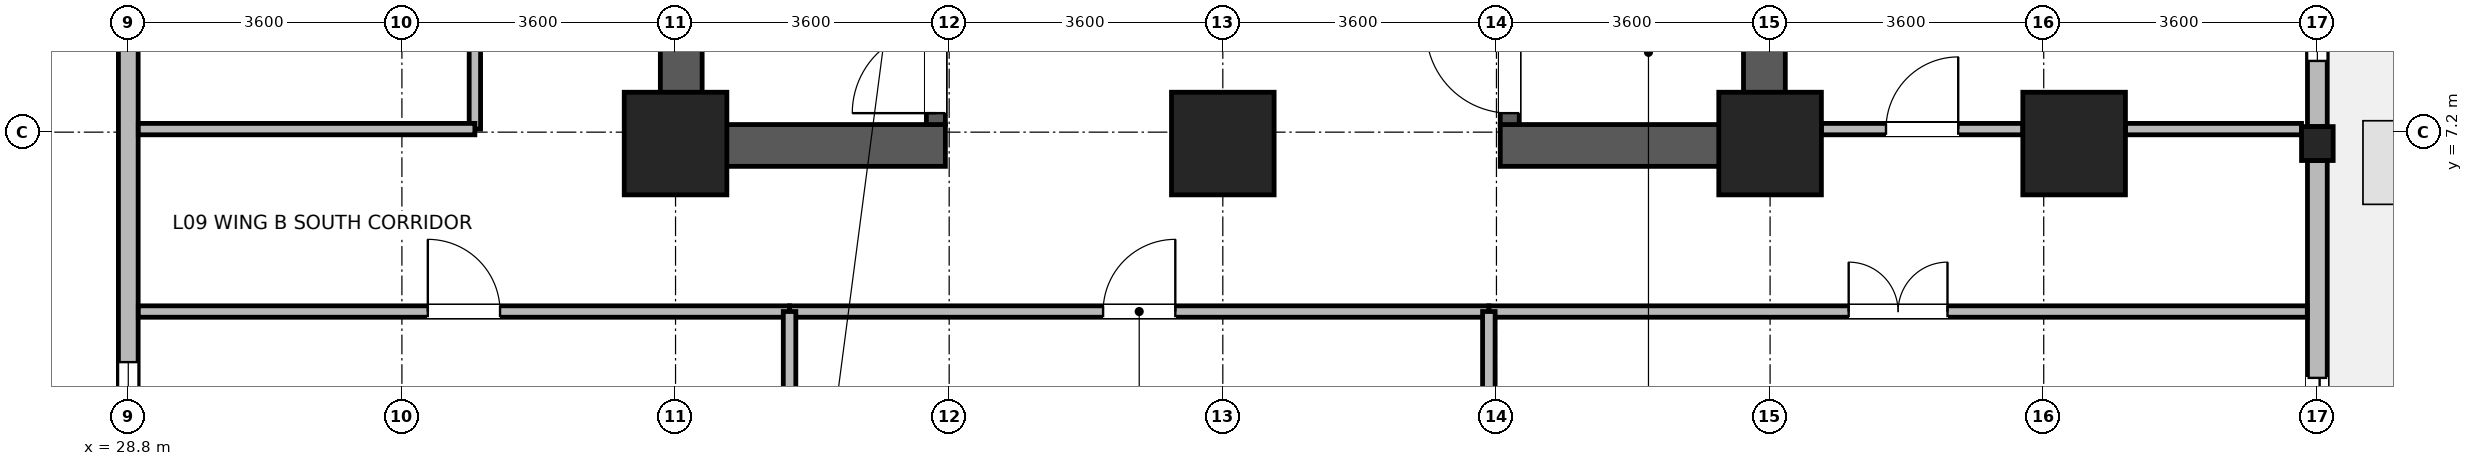
"""IFC4 building model, lengths in metres.
Left out: names, types, materials, properties, quantities, classifications, styles, units other than length and angle.
Written with IfcOpenShell. Run it as: python <this file> out.ifc"""

import sys

from ifc_helpers import new_model, si_unit, direction, frame, frame_2d, origin, origin_2d, place, context, subcontext, project, spatial, rectangle, i_section, extrude, source, transform, mapped, element, fill, save


model = new_model("IFC4")
c1 = context("Model", 3, precision=1e-05, world=origin(), true_north=direction((0.0, 1.0)))
c2 = subcontext(c1, "Body", "Model", "MODEL_VIEW")
j1 = project(units=[si_unit("LENGTHUNIT", "METRE"), si_unit("PLANEANGLEUNIT", "RADIAN")], contexts=[c1])
p1 = place(None, origin())
s1 = spatial("IfcSite", under=j1, at=p1, CompositionType="ELEMENT")
p2 = place(p1, origin())
s2 = spatial("IfcBuilding", under=s1, at=p2, CompositionType="ELEMENT")
p3 = place(p2, frame((0.0, 0.0, 40.1)))
s3 = spatial("IfcBuildingStorey", under=s2, at=p3, CompositionType="ELEMENT", Elevation=40.1)
for number, where, z_axis, x_axis in (
    (1, (36.075, 6.75, 0.0), (0.0, 0.0, 1.0), (0.0, 1.0, 0.0)),
    (2, (50.325, 6.75, 0.0), (0.0, 0.0, 1.0), (0.0, 1.0, 0.0)),
):
    element("IfcWall", number, at=place(p3, frame(where, z_axis=z_axis, x_axis=x_axis)), inside=s3, PredefinedType="SHEAR", context=c2, shape_type="SweptSolid", body=[
        extrude(rectangle(XDim=8.1, YDim=0.55, at=frame_2d((4.05, 0.0))), origin(), (0.0, 0.0, 1.0), 3.45),
    ])
for number, where, z_axis, x_axis in (
    (3, (36.35, 7.025, 0.0), (0.0, 0.0, 1.0), (1.0, 0.0, 0.0)),
    (4, (46.85, 7.025, 0.0), (0.0, 0.0, 1.0), (1.0, 0.0, 0.0)),
):
    element("IfcWall", number, at=place(p3, frame(where, z_axis=z_axis, x_axis=x_axis)), inside=s3, PredefinedType="SHEAR", context=c2, shape_type="SweptSolid", body=[
        extrude(rectangle(XDim=3.2, YDim=0.55, at=frame_2d((1.6, 0.0))), origin(), (0.0, 0.0, 1.0), 3.45),
    ])
p4 = place(p3, frame((39.425, 7.3, 0.0), z_axis=(0.0, 0.0, 1.0), x_axis=(0.0, 1.0, 0.0)))
e5 = element("IfcWall", 5, at=p4, inside=s3, PredefinedType="SHEAR", context=c2, shape_type="SweptSolid", body=[
    extrude(rectangle(XDim=7.0, YDim=0.25, at=frame_2d((3.5, 0.0))), origin(), (0.0, 0.0, 1.0), 3.45),
])
p5 = place(p4, frame((0.15, 0.0, 0.0)))
e6 = element("IfcOpeningElement", 6, at=p5, cuts=e5, PredefinedType="OPENING", context=c2, shape_type="SweptSolid", body=[
    extrude(rectangle(XDim=1.1, YDim=2.08, at=frame_2d((0.55, 1.04))), frame((0.0, 0.135, 0.0), z_axis=(0.0, -1.0, 0.0), x_axis=(1.0, 0.0, 0.0)), (0.0, 0.0, 1.0), 0.27),
])
p6 = place(p3, frame((46.975, 7.3, 0.0), z_axis=(0.0, 0.0, 1.0), x_axis=(0.0, 1.0, 0.0)))
e7 = element("IfcWall", 7, at=p6, inside=s3, PredefinedType="SHEAR", context=c2, shape_type="SweptSolid", body=[
    extrude(rectangle(XDim=7.0, YDim=0.25, at=frame_2d((3.5, 0.0))), origin(), (0.0, 0.0, 1.0), 3.45),
])
p7 = place(p6, frame((0.15, 0.0, 0.0)))
e8 = element("IfcOpeningElement", 8, at=p7, cuts=e7, PredefinedType="OPENING", context=c2, shape_type="SweptSolid", body=[
    extrude(rectangle(XDim=1.1, YDim=2.08, at=frame_2d((0.55, 1.04))), frame((0.0, 0.135, 0.0), z_axis=(0.0, -1.0, 0.0), x_axis=(1.0, 0.0, 0.0)), (0.0, 0.0, 1.0), 0.27),
])
m1 = source(origin(), c2, "Body", "SweptSolid", [
    extrude(rectangle(XDim=1.35, YDim=1.35, at=origin_2d()), origin(), (0.0, 0.0, 1.0), 3.7),
])
for number, where, z_axis, x_axis in (
    (9, (36.0, 7.05, 0.0), (0.0, 0.0, 1.0), (1.0, 0.0, 0.0)),
    (10, (43.2, 7.05, 0.0), (0.0, 0.0, 1.0), (1.0, 0.0, 0.0)),
    (11, (50.4, 7.05, 0.0), (0.0, 0.0, 1.0), (1.0, 0.0, 0.0)),
    (12, (54.4, 7.05, 0.0), (0.0, 0.0, 1.0), (1.0, 0.0, 0.0)),
):
    element("IfcColumn", number, at=place(p3, frame(where, z_axis=z_axis, x_axis=x_axis)), inside=s3, PredefinedType="COLUMN", context=c2, shape_type="MappedRepresentation", body=[
        mapped(m1, transform((0.0, 0.0, 0.0), x_axis=(1.0, 0.0, 0.0), y_axis=(0.0, 1.0, 0.0), z_axis=(0.0, 0.0, 1.0), scale=1.0)),
    ])
m2 = source(origin(), c2, "Body", "SweptSolid", [
    extrude(i_section(OverallWidth=0.416, OverallDepth=0.446, WebThickness=0.029, FlangeThickness=0.04, FilletRadius=0.015, at=origin_2d()), origin(), (0.0, 0.0, 1.0), 3.7),
])
p8 = place(p3, frame((57.6, 7.05, 0.0), z_axis=(0.0, 0.0, 1.0), x_axis=(1.0, 0.0, 0.0)))
e13 = element("IfcColumn", 13, at=p8, inside=s3, PredefinedType="COLUMN", context=c2, shape_type="MappedRepresentation", body=[
    mapped(m2, transform((0.0, 0.0, 0.0), x_axis=(1.0, 0.0, 0.0), y_axis=(0.0, 1.0, 0.0), z_axis=(0.0, 0.0, 1.0), scale=1.0)),
])
p9 = place(p3, frame((57.6, 6.826, 0.0), z_axis=(0.0, 0.0, 1.0), x_axis=(0.0, -1.0, 0.0)))
e14 = element("IfcWall", 14, at=p9, inside=s3, PredefinedType="STANDARD", context=c2, shape_type="SweptSolid", body=[
    extrude(rectangle(XDim=5.156, YDim=0.26, at=frame_2d((2.578, 0.0))), origin(), (0.0, 0.0, 1.0), 3.43),
])
p10 = place(p9, frame((2.859, 0.0, 0.0)))
e15 = element("IfcOpeningElement", 15, at=p10, cuts=e14, PredefinedType="OPENING", context=c2, shape_type="SweptSolid", body=[
    extrude(rectangle(XDim=1.5, YDim=2.15, at=frame_2d((0.75, 1.075))), frame((0.0, 0.14, 0.0), z_axis=(0.0, -1.0, 0.0), x_axis=(1.0, 0.0, 0.0)), (0.0, 0.0, 1.0), 0.28),
])
p11 = place(p3, frame((57.6, 14.326, 0.0), z_axis=(0.0, 0.0, 1.0), x_axis=(0.0, -1.0, 0.0)))
e16 = element("IfcWall", 16, at=p11, inside=s3, PredefinedType="STANDARD", context=c2, shape_type="SweptSolid", body=[
    extrude(rectangle(XDim=7.052, YDim=0.26, at=frame_2d((3.526, 0.0))), origin(), (0.0, 0.0, 1.0), 2.93),
])
p12 = place(p11, frame((0.863, 0.0, 0.85)))
e17 = element("IfcOpeningElement", 17, at=p12, cuts=e16, PredefinedType="OPENING", context=c2, shape_type="SweptSolid", body=[
    extrude(rectangle(XDim=1.8, YDim=1.85, at=frame_2d((0.9, 0.925))), frame((0.0, 0.14, 0.0), z_axis=(0.0, -1.0, 0.0), x_axis=(1.0, 0.0, 0.0)), (0.0, 0.0, 1.0), 0.28),
])
p13 = place(p11, frame((4.389, 0.0, 0.85)))
e18 = element("IfcOpeningElement", 18, at=p13, cuts=e16, PredefinedType="OPENING", context=c2, shape_type="SweptSolid", body=[
    extrude(rectangle(XDim=1.8, YDim=1.85, at=frame_2d((0.9, 0.925))), frame((0.0, 0.14, 0.0), z_axis=(0.0, -1.0, 0.0), x_axis=(1.0, 0.0, 0.0)), (0.0, 0.0, 1.0), 0.28),
])
p14 = place(p3, frame((28.8, 1.67, 0.0), z_axis=(0.0, 0.0, 1.0), x_axis=(0.0, 1.0, 0.0)))
e19 = element("IfcWall", 19, at=p14, inside=s3, PredefinedType="STANDARD", context=c2, shape_type="SweptSolid", body=[
    extrude(rectangle(XDim=19.254, YDim=0.26, at=frame_2d((9.627, 0.0))), origin(), (0.0, 0.0, 1.0), 3.43),
])
p15 = place(p14, frame((0.705, 0.0, 0.85)))
e20 = element("IfcOpeningElement", 20, at=p15, cuts=e19, PredefinedType="OPENING", context=c2, shape_type="SweptSolid", body=[
    extrude(rectangle(XDim=1.8, YDim=1.85, at=frame_2d((0.9, 0.925))), frame((0.0, 0.14, 0.0), z_axis=(0.0, -1.0, 0.0), x_axis=(1.0, 0.0, 0.0)), (0.0, 0.0, 1.0), 0.28),
])
p16 = place(p14, frame((7.123, 0.0, 0.85)))
e21 = element("IfcOpeningElement", 21, at=p16, cuts=e19, PredefinedType="OPENING", context=c2, shape_type="SweptSolid", body=[
    extrude(rectangle(XDim=1.8, YDim=1.85, at=frame_2d((0.9, 0.925))), frame((0.0, 0.14, 0.0), z_axis=(0.0, -1.0, 0.0), x_axis=(1.0, 0.0, 0.0)), (0.0, 0.0, 1.0), 0.28),
])
p17 = place(p14, frame((10.332, 0.0, 0.85)))
e22 = element("IfcOpeningElement", 22, at=p17, cuts=e19, PredefinedType="OPENING", context=c2, shape_type="SweptSolid", body=[
    extrude(rectangle(XDim=1.8, YDim=1.85, at=frame_2d((0.9, 0.925))), frame((0.0, 0.14, 0.0), z_axis=(0.0, -1.0, 0.0), x_axis=(1.0, 0.0, 0.0)), (0.0, 0.0, 1.0), 0.28),
])
p18 = place(p14, frame((13.541, 0.0, 0.85)))
e23 = element("IfcOpeningElement", 23, at=p18, cuts=e19, PredefinedType="OPENING", context=c2, shape_type="SweptSolid", body=[
    extrude(rectangle(XDim=1.8, YDim=1.85, at=frame_2d((0.9, 0.925))), frame((0.0, 0.14, 0.0), z_axis=(0.0, -1.0, 0.0), x_axis=(1.0, 0.0, 0.0)), (0.0, 0.0, 1.0), 0.28),
])
p19 = place(p14, frame((16.75, 0.0, 0.85)))
e24 = element("IfcOpeningElement", 24, at=p19, cuts=e19, PredefinedType="OPENING", context=c2, shape_type="SweptSolid", body=[
    extrude(rectangle(XDim=1.8, YDim=1.85, at=frame_2d((0.9, 0.925))), frame((0.0, 0.14, 0.0), z_axis=(0.0, -1.0, 0.0), x_axis=(1.0, 0.0, 0.0)), (0.0, 0.0, 1.0), 0.28),
])
p20 = place(p3, frame((46.7, 4.84, 0.0), z_axis=(0.0, 0.0, 1.0), x_axis=(1.0, 0.0, 0.0)))
e25 = element("IfcWall", 25, at=p20, inside=s3, PredefinedType="PARTITIONING", context=c2, shape_type="SweptSolid", body=[
    extrude(rectangle(XDim=10.768, YDim=0.15, at=frame_2d((5.384, 0.0))), origin(), (0.0, 0.0, 1.0), 3.43),
])
p21 = place(p20, frame((4.734, 0.0, 0.0)))
e26 = element("IfcOpeningElement", 26, at=p21, cuts=e25, PredefinedType="OPENING", context=c2, shape_type="SweptSolid", body=[
    extrude(rectangle(XDim=1.3, YDim=2.12, at=frame_2d((0.65, 1.06))), frame((0.0, 0.085, 0.0), z_axis=(0.0, -1.0, 0.0), x_axis=(1.0, 0.0, 0.0)), (0.0, 0.0, 1.0), 0.17),
])
p22 = place(p3, frame((37.5, 4.84, 0.0), z_axis=(0.0, 0.0, 1.0), x_axis=(1.0, 0.0, 0.0)))
e27 = element("IfcWall", 27, at=p22, inside=s3, PredefinedType="PARTITIONING", context=c2, shape_type="SweptSolid", body=[
    extrude(rectangle(XDim=9.2, YDim=0.15, at=frame_2d((4.6, 0.0))), origin(), (0.0, 0.0, 1.0), 3.43),
])
p23 = place(p22, frame((4.125, 0.0, 0.0)))
e28 = element("IfcOpeningElement", 28, at=p23, cuts=e27, PredefinedType="OPENING", context=c2, shape_type="SweptSolid", body=[
    extrude(rectangle(XDim=0.95, YDim=2.1, at=frame_2d((0.475, 1.05))), frame((0.0, 0.085, 0.0), z_axis=(0.0, -1.0, 0.0), x_axis=(1.0, 0.0, 0.0)), (0.0, 0.0, 1.0), 0.17),
])
p24 = place(p3, frame((28.932, 4.84, 0.0), z_axis=(0.0, 0.0, 1.0), x_axis=(1.0, 0.0, 0.0)))
e29 = element("IfcWall", 29, at=p24, inside=s3, PredefinedType="PARTITIONING", context=c2, shape_type="SweptSolid", body=[
    extrude(rectangle(XDim=8.568, YDim=0.15, at=frame_2d((4.284, 0.0))), origin(), (0.0, 0.0, 1.0), 3.43),
])
p25 = place(p24, frame((3.809, 0.0, 0.0)))
e30 = element("IfcOpeningElement", 30, at=p25, cuts=e29, PredefinedType="OPENING", context=c2, shape_type="SweptSolid", body=[
    extrude(rectangle(XDim=0.95, YDim=2.1, at=frame_2d((0.475, 1.05))), frame((0.0, 0.085, 0.0), z_axis=(0.0, -1.0, 0.0), x_axis=(1.0, 0.0, 0.0)), (0.0, 0.0, 1.0), 0.17),
])
p26 = place(p3, frame((33.36, 7.24, 0.0), z_axis=(0.0, 0.0, 1.0), x_axis=(0.0, 1.0, 0.0)))
e31 = element("IfcWall", 31, at=p26, inside=s3, PredefinedType="PARTITIONING", context=c2, shape_type="SweptSolid", body=[
    extrude(rectangle(XDim=7.26, YDim=0.15, at=frame_2d((3.63, 0.0))), origin(), (0.0, 0.0, 1.0), 3.43),
])
p27 = place(p26, frame((2.98, 0.0, 0.0)))
e32 = element("IfcOpeningElement", 32, at=p27, cuts=e31, PredefinedType="OPENING", context=c2, shape_type="SweptSolid", body=[
    extrude(rectangle(XDim=1.3, YDim=2.12, at=frame_2d((0.65, 1.06))), frame((0.0, 0.085, 0.0), z_axis=(0.0, -1.0, 0.0), x_axis=(1.0, 0.0, 0.0)), (0.0, 0.0, 1.0), 0.17),
])
p28 = place(p3, frame((51.075, 7.24, 0.0), z_axis=(0.0, 0.0, 1.0), x_axis=(1.0, 0.0, 0.0)))
e33 = element("IfcWall", 33, at=p28, inside=s3, PredefinedType="PARTITIONING", context=c2, shape_type="SweptSolid", body=[
    extrude(rectangle(XDim=2.65, YDim=0.15, at=frame_2d((1.325, 0.0))), origin(), (0.0, 0.0, 1.0), 2.78),
])
p29 = place(p28, frame((0.85, 0.0, 0.0)))
e34 = element("IfcOpeningElement", 34, at=p29, cuts=e33, PredefinedType="OPENING", context=c2, shape_type="SweptSolid", body=[
    extrude(rectangle(XDim=0.95, YDim=2.1, at=frame_2d((0.475, 1.05))), frame((0.0, 0.085, 0.0), z_axis=(0.0, -1.0, 0.0), x_axis=(1.0, 0.0, 0.0)), (0.0, 0.0, 1.0), 0.17),
])
p30 = place(p3, frame((55.075, 7.24, 0.0), z_axis=(0.0, 0.0, 1.0), x_axis=(1.0, 0.0, 0.0)))
e35 = element("IfcWall", 35, at=p30, inside=s3, PredefinedType="PARTITIONING", context=c2, shape_type="SweptSolid", body=[
    extrude(rectangle(XDim=2.317, YDim=0.15, at=frame_2d((1.159, 0.0))), origin(), (0.0, 0.0, 1.0), 2.78),
])
p31 = place(p3, frame((28.932, 7.24, 0.0), z_axis=(0.0, 0.0, 1.0), x_axis=(1.0, 0.0, 0.0)))
e36 = element("IfcWall", 36, at=p31, inside=s3, PredefinedType="PARTITIONING", context=c2, shape_type="SweptSolid", body=[
    extrude(rectangle(XDim=4.428, YDim=0.15, at=frame_2d((2.214, 0.0))), origin(), (0.0, 0.0, 1.0), 3.43),
])
for number, where, z_axis, x_axis in (
    (37, (37.5, 1.932, 0.0), (0.0, 0.0, 1.0), (0.0, 1.0, 0.0)),
    (38, (46.7, 1.932, 0.0), (0.0, 0.0, 1.0), (0.0, 1.0, 0.0)),
):
    element("IfcWall", number, at=place(p3, frame(where, z_axis=z_axis, x_axis=x_axis)), inside=s3, PredefinedType="PARTITIONING", context=c2, shape_type="SweptSolid", body=[
        extrude(rectangle(XDim=2.908, YDim=0.165, at=frame_2d((1.454, 0.0))), origin(), (0.0, 0.0, 1.0), 3.43),
    ])
p32 = place(p10, origin())
e39 = element("IfcDoor", 39, at=p32, inside=s3, OperationType="SLIDING_TO_LEFT", PredefinedType="DOOR", context=c2, shape_type="SweptSolid", body=[
    extrude(rectangle(XDim=1.5, YDim=2.15, at=frame_2d((0.75, 1.075))), frame((0.0, 0.025, 0.0), z_axis=(0.0, -1.0, 0.0), x_axis=(1.0, 0.0, 0.0)), (0.0, 0.0, 1.0), 0.05),
])
fill(e15, e39)
p33 = place(p13, origin())
e40 = element("IfcWindow", 40, at=p33, inside=s3, PartitioningType="SINGLE_PANEL", PredefinedType="WINDOW", context=c2, shape_type="SweptSolid", body=[
    extrude(rectangle(XDim=1.8, YDim=1.85, at=frame_2d((0.9, 0.925))), frame((0.0, 0.03, 0.0), z_axis=(0.0, -1.0, 0.0), x_axis=(1.0, 0.0, 0.0)), (0.0, 0.0, 1.0), 0.06),
])
fill(e18, e40)
p34 = place(p15, origin())
e41 = element("IfcWindow", 41, at=p34, inside=s3, PartitioningType="SINGLE_PANEL", PredefinedType="WINDOW", context=c2, shape_type="SweptSolid", body=[
    extrude(rectangle(XDim=1.8, YDim=1.85, at=frame_2d((0.9, 0.925))), frame((0.0, 0.03, 0.0), z_axis=(0.0, -1.0, 0.0), x_axis=(1.0, 0.0, 0.0)), (0.0, 0.0, 1.0), 0.06),
])
fill(e20, e41)
p35 = place(p5, origin())
e42 = element("IfcDoor", 42, at=p35, inside=s3, OperationType="SINGLE_SWING_LEFT", PredefinedType="DOOR", context=c2, shape_type="SweptSolid", body=[
    extrude(rectangle(XDim=1.1, YDim=2.08, at=frame_2d((0.55, 1.04))), frame((0.0, 0.025, 0.0), z_axis=(0.0, -1.0, 0.0), x_axis=(1.0, 0.0, 0.0)), (0.0, 0.0, 1.0), 0.05),
])
fill(e6, e42)
p36 = place(p7, origin())
e43 = element("IfcDoor", 43, at=p36, inside=s3, OperationType="SINGLE_SWING_RIGHT", PredefinedType="DOOR", context=c2, shape_type="SweptSolid", body=[
    extrude(rectangle(XDim=1.1, YDim=2.08, at=frame_2d((0.55, 1.04))), frame((0.0, 0.025, 0.0), z_axis=(0.0, -1.0, 0.0), x_axis=(1.0, 0.0, 0.0)), (0.0, 0.0, 1.0), 0.05),
])
fill(e8, e43)
p37 = place(p21, origin())
e44 = element("IfcDoor", 44, at=p37, inside=s3, OperationType="DOUBLE_DOOR_SINGLE_SWING", PredefinedType="DOOR", context=c2, shape_type="SweptSolid", body=[
    extrude(rectangle(XDim=1.3, YDim=2.12, at=frame_2d((0.65, 1.06))), frame((0.0, 0.025, 0.0), z_axis=(0.0, -1.0, 0.0), x_axis=(1.0, 0.0, 0.0)), (0.0, 0.0, 1.0), 0.05),
])
fill(e26, e44)
p38 = place(p23, origin())
e45 = element("IfcDoor", 45, at=p38, inside=s3, OperationType="SINGLE_SWING_RIGHT", PredefinedType="DOOR", context=c2, shape_type="SweptSolid", body=[
    extrude(rectangle(XDim=0.95, YDim=2.1, at=frame_2d((0.475, 1.05))), frame((0.0, 0.025, 0.0), z_axis=(0.0, -1.0, 0.0), x_axis=(1.0, 0.0, 0.0)), (0.0, 0.0, 1.0), 0.05),
])
fill(e28, e45)
p39 = place(p25, origin())
e46 = element("IfcDoor", 46, at=p39, inside=s3, OperationType="SINGLE_SWING_LEFT", PredefinedType="DOOR", context=c2, shape_type="SweptSolid", body=[
    extrude(rectangle(XDim=0.95, YDim=2.1, at=frame_2d((0.475, 1.05))), frame((0.0, 0.025, 0.0), z_axis=(0.0, -1.0, 0.0), x_axis=(1.0, 0.0, 0.0)), (0.0, 0.0, 1.0), 0.05),
])
fill(e30, e46)
p40 = place(p29, origin())
e47 = element("IfcDoor", 47, at=p40, inside=s3, OperationType="SINGLE_SWING_RIGHT", PredefinedType="DOOR", context=c2, shape_type="SweptSolid", body=[
    extrude(rectangle(XDim=0.95, YDim=2.1, at=frame_2d((0.475, 1.05))), frame((0.0, 0.025, 0.0), z_axis=(0.0, -1.0, 0.0), x_axis=(1.0, 0.0, 0.0)), (0.0, 0.0, 1.0), 0.05),
])
fill(e34, e47)
save(model, sys.argv[1])
